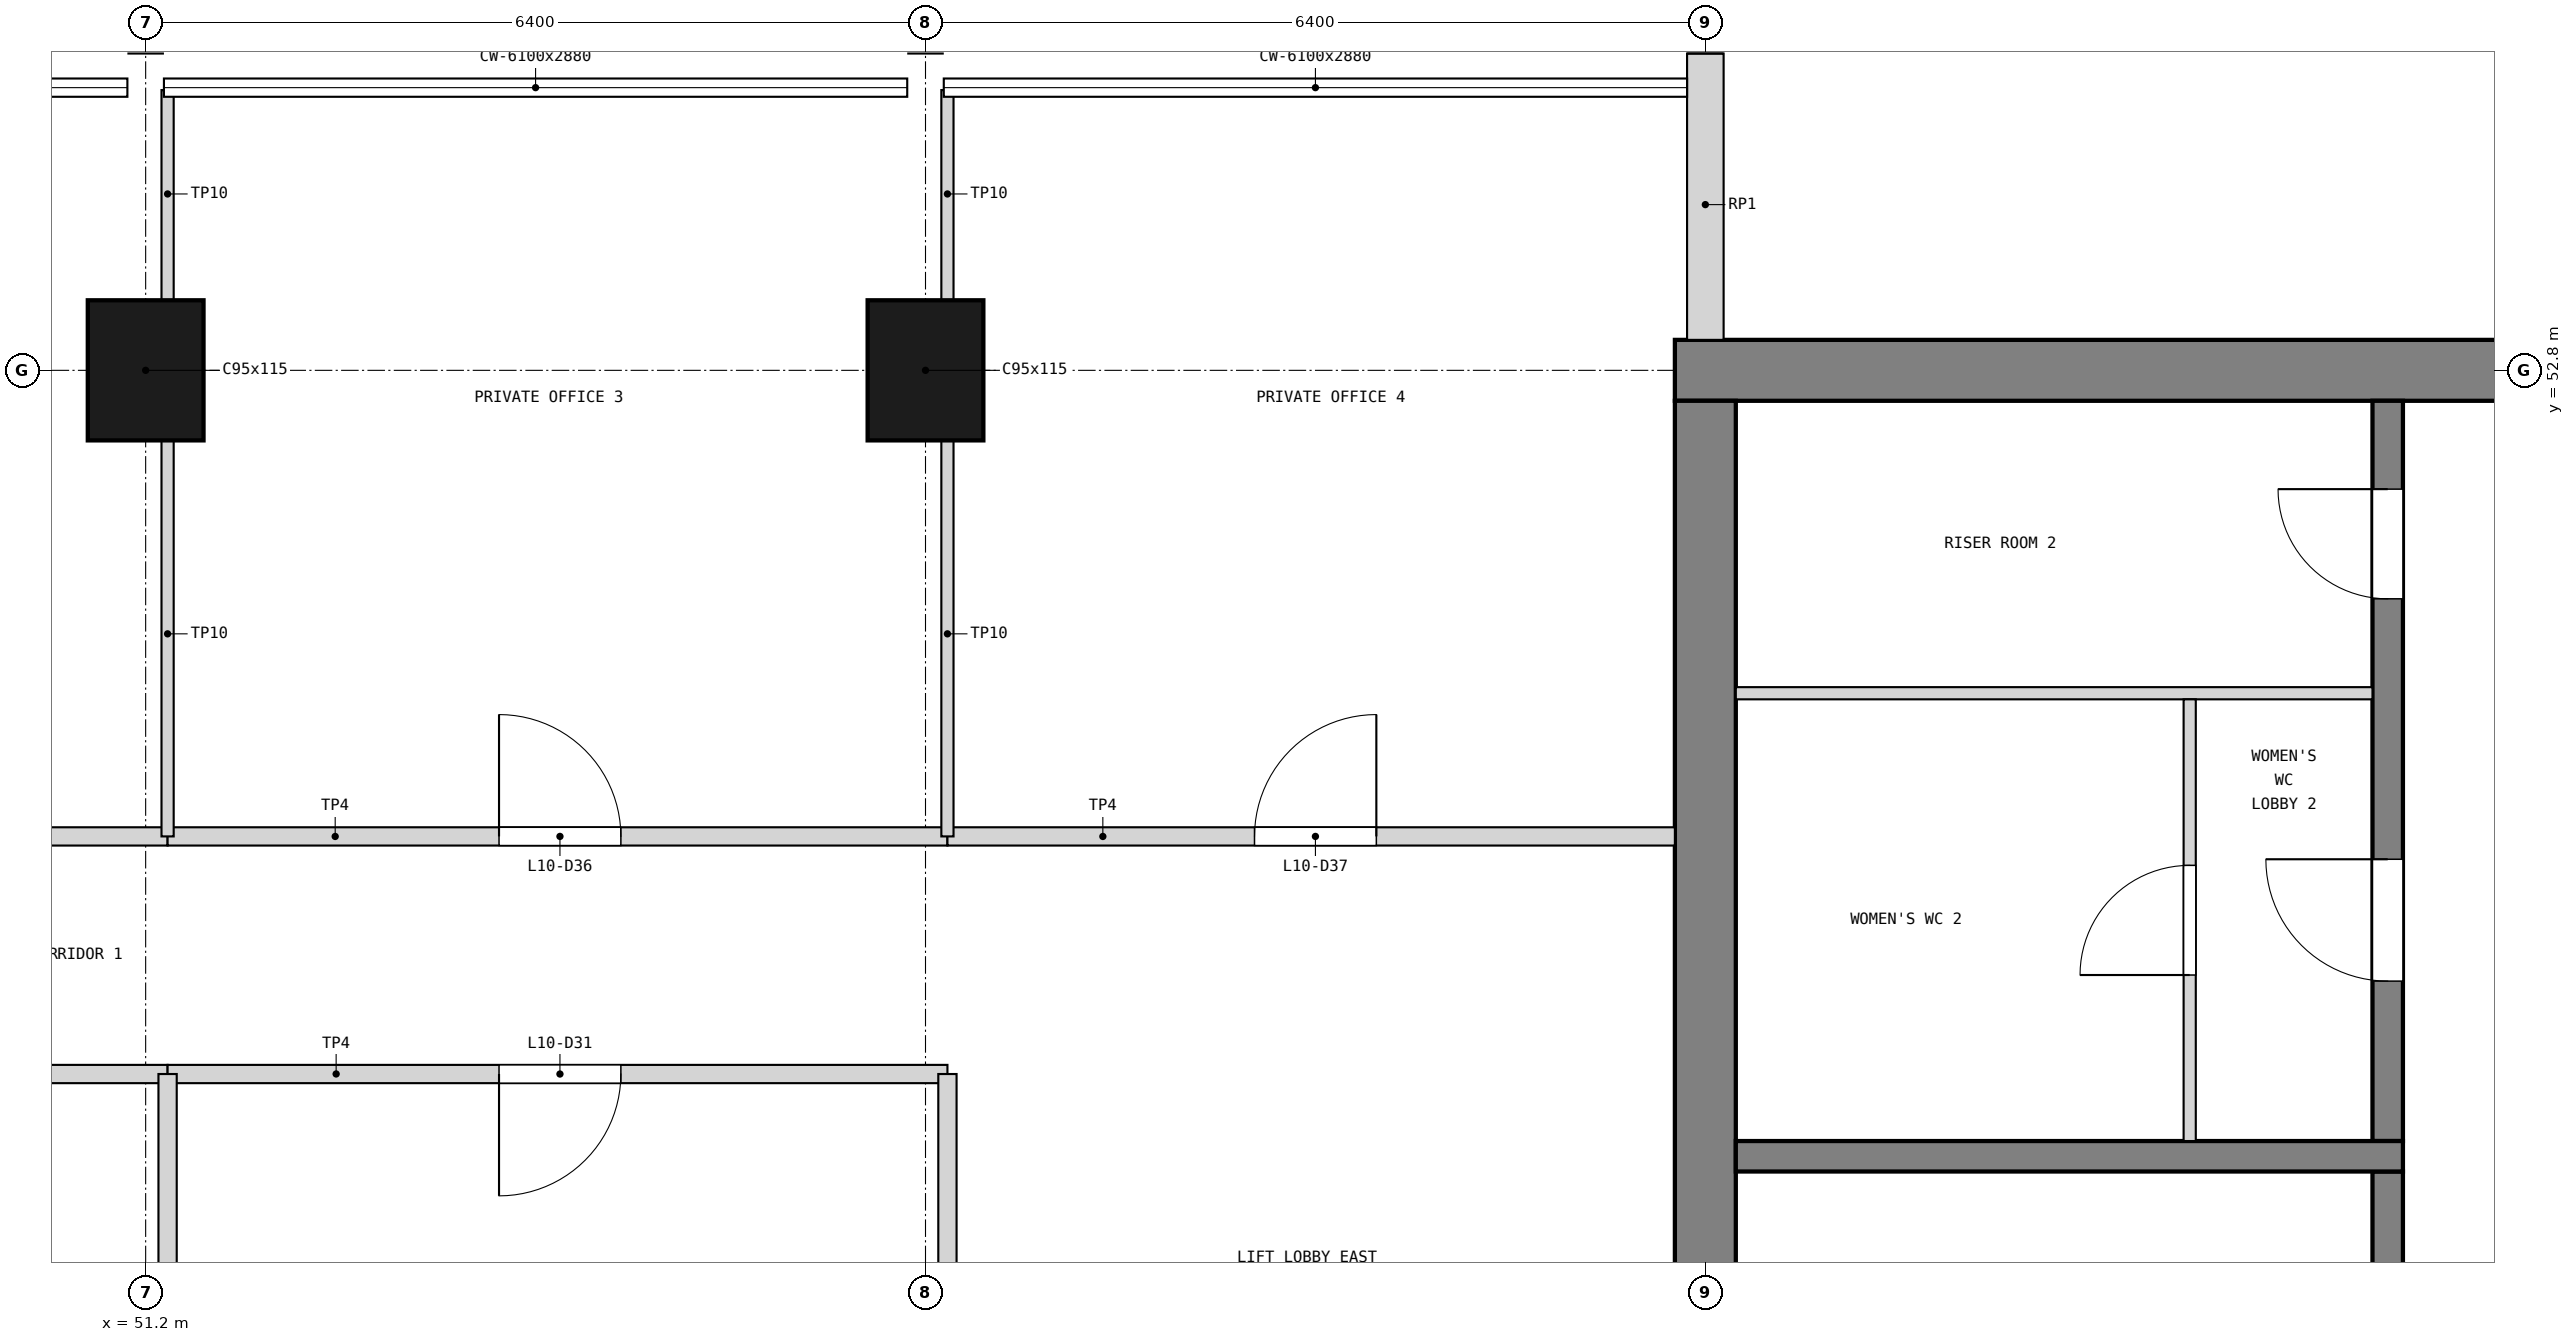
"""IFC4 building model, lengths in metres.
Left out: names, types, materials, properties, quantities, classifications, styles, units other than length and angle.
Written with IfcOpenShell. Run it as: python <this file> out.ifc"""

import sys

from ifc_helpers import new_model, si_unit, direction, frame, frame_2d, origin, origin_2d, place, context, subcontext, project, spatial, rectangle, extrude, element, fill, save


model = new_model("IFC4")
c1 = context("Model", 3, precision=1e-05, world=origin(), true_north=direction((0.0, 1.0)))
c2 = subcontext(c1, "Body", "Model", "MODEL_VIEW")
j1 = project(units=[si_unit("LENGTHUNIT", "METRE"), si_unit("PLANEANGLEUNIT", "RADIAN")], contexts=[c1])
p1 = place(None, origin())
s1 = spatial("IfcSite", under=j1, at=p1, CompositionType="ELEMENT")
p2 = place(p1, origin())
s2 = spatial("IfcBuilding", under=s1, at=p2, CompositionType="ELEMENT")
p3 = place(p2, frame((0.0, 0.0, 40.5)))
s3 = spatial("IfcBuildingStorey", under=s2, at=p3, CompositionType="ELEMENT", Elevation=40.5)
p4 = place(p3, frame((63.75, 52.8, 0.0), z_axis=(0.0, 0.0, 1.0), x_axis=(1.0, 0.0, 0.0)))
e1 = element("IfcWall", 1, at=p4, inside=s3, PredefinedType="SHEAR", context=c2, shape_type="SweptSolid", body=[
    extrude(rectangle(XDim=13.3, YDim=0.5, at=frame_2d((6.65, 0.0))), origin(), (0.0, 0.0, 1.0), 3.9),
])
p5 = place(p4, frame((11.05, 0.0, 1.0)))
e2 = element("IfcOpeningElement", 2, at=p5, cuts=e1, PredefinedType="OPENING", context=c2, shape_type="SweptSolid", body=[
    extrude(rectangle(XDim=0.4, YDim=2.0, at=frame_2d((0.2, 1.0))), frame((0.0, 0.26, 0.0), z_axis=(0.0, -1.0, 0.0), x_axis=(1.0, 0.0, 0.0)), (0.0, 0.0, 1.0), 0.52),
])
p6 = place(p3, frame((64.0, 33.85, 0.0), z_axis=(0.0, 0.0, 1.0), x_axis=(0.0, 1.0, 0.0)))
e3 = element("IfcWall", 3, at=p6, inside=s3, PredefinedType="SHEAR", context=c2, shape_type="SweptSolid", body=[
    extrude(rectangle(XDim=18.7, YDim=0.5, at=frame_2d((9.35, 0.0))), origin(), (0.0, 0.0, 1.0), 3.9),
])
p7 = place(p6, frame((8.35, 0.0, 0.0)))
e4 = element("IfcOpeningElement", 4, at=p7, cuts=e3, PredefinedType="OPENING", context=c2, shape_type="SweptSolid", body=[
    extrude(rectangle(XDim=2.0, YDim=2.1, at=frame_2d((1.0, 1.05))), frame((0.0, 0.26, 0.0), z_axis=(0.0, -1.0, 0.0), x_axis=(1.0, 0.0, 0.0)), (0.0, 0.0, 1.0), 0.52),
])
for number, where, z_axis, x_axis in (
    (5, (51.2, 52.8, 0.0), (0.0, 0.0, 1.0), (1.0, 0.0, 0.0)),
    (6, (57.6, 52.8, 0.0), (0.0, 0.0, 1.0), (1.0, 0.0, 0.0)),
):
    element("IfcColumn", number, at=place(p3, frame(where, z_axis=z_axis, x_axis=x_axis)), inside=s3, PredefinedType="COLUMN", context=c2, shape_type="SweptSolid", body=[
        extrude(rectangle(XDim=0.95, YDim=1.15, at=origin_2d()), origin(), (0.0, 0.0, 1.0), 3.9),
    ])
p8 = place(p3, frame((64.0, 53.05, 0.0), z_axis=(0.0, 0.0, 1.0), x_axis=(0.0, 1.0, 0.0)))
e7 = element("IfcWall", 7, at=p8, inside=s3, PredefinedType="SOLIDWALL", context=c2, shape_type="SweptSolid", body=[
    extrude(rectangle(XDim=2.35, YDim=0.3, at=frame_2d((1.175, 0.0))), origin(), (0.0, 0.0, 1.0), 2.88),
])
p9 = place(p3, frame((69.6, 40.175, 0.0), z_axis=(0.0, 0.0, 1.0), x_axis=(0.0, 1.0, 0.0)))
e8 = element("IfcWall", 8, at=p9, inside=s3, PredefinedType="SOLIDWALL", context=c2, shape_type="SweptSolid", body=[
    extrude(rectangle(XDim=6.05, YDim=0.25, at=frame_2d((3.025, 0.0))), origin(), (0.0, 0.0, 1.0), 3.6),
])
p10 = place(p9, frame((2.025, 0.0, 0.0)))
e9 = element("IfcOpeningElement", 9, at=p10, cuts=e8, PredefinedType="OPENING", context=c2, shape_type="SweptSolid", body=[
    extrude(rectangle(XDim=2.0, YDim=2.1, at=frame_2d((1.0, 1.05))), frame((0.0, 0.135, 0.0), z_axis=(0.0, -1.0, 0.0), x_axis=(1.0, 0.0, 0.0)), (0.0, 0.0, 1.0), 0.27),
])
p11 = place(p3, frame((69.6, 46.475, 0.0), z_axis=(0.0, 0.0, 1.0), x_axis=(0.0, 1.0, 0.0)))
e10 = element("IfcWall", 10, at=p11, inside=s3, PredefinedType="SOLIDWALL", context=c2, shape_type="SweptSolid", body=[
    extrude(rectangle(XDim=6.075, YDim=0.25, at=frame_2d((3.038, 0.0))), origin(), (0.0, 0.0, 1.0), 3.6),
])
p12 = place(p11, frame((1.312, 0.0, 0.0)))
e11 = element("IfcOpeningElement", 11, at=p12, cuts=e10, PredefinedType="OPENING", context=c2, shape_type="SweptSolid", body=[
    extrude(rectangle(XDim=1.0, YDim=2.1, at=frame_2d((0.5, 1.05))), frame((0.0, 0.135, 0.0), z_axis=(0.0, -1.0, 0.0), x_axis=(1.0, 0.0, 0.0)), (0.0, 0.0, 1.0), 0.27),
])
p13 = place(p11, frame((4.45, 0.0, 0.0)))
e12 = element("IfcOpeningElement", 12, at=p13, cuts=e10, PredefinedType="OPENING", context=c2, shape_type="SweptSolid", body=[
    extrude(rectangle(XDim=0.9, YDim=2.1, at=frame_2d((0.45, 1.05))), frame((0.0, 0.135, 0.0), z_axis=(0.0, -1.0, 0.0), x_axis=(1.0, 0.0, 0.0)), (0.0, 0.0, 1.0), 0.27),
])
p14 = place(p3, frame((69.725, 46.35, 0.0), z_axis=(0.0, 0.0, 1.0), x_axis=(-1.0, 0.0, 0.0)))
e13 = element("IfcWall", 13, at=p14, inside=s3, PredefinedType="SOLIDWALL", context=c2, shape_type="SweptSolid", body=[
    extrude(rectangle(XDim=5.475, YDim=0.25, at=frame_2d((2.738, 0.0))), origin(), (0.0, 0.0, 1.0), 3.6),
])
p15 = place(p3, frame((69.475, 50.15, 0.0), z_axis=(0.0, 0.0, 1.0), x_axis=(-1.0, 0.0, 0.0)))
e14 = element("IfcWall", 14, at=p15, inside=s3, PredefinedType="PARTITIONING", context=c2, shape_type="SweptSolid", body=[
    extrude(rectangle(XDim=5.225, YDim=0.1, at=frame_2d((2.613, 0.0))), origin(), (0.0, 0.0, 1.0), 3.6),
])
p16 = place(p3, frame((67.975, 46.475, 0.0), z_axis=(0.0, 0.0, 1.0), x_axis=(0.0, 1.0, 0.0)))
e15 = element("IfcWall", 15, at=p16, inside=s3, PredefinedType="PARTITIONING", context=c2, shape_type="SweptSolid", body=[
    extrude(rectangle(XDim=3.625, YDim=0.1, at=frame_2d((1.812, 0.0))), origin(), (0.0, 0.0, 1.0), 3.6),
])
p17 = place(p16, frame((1.363, 0.0, 0.0)))
e16 = element("IfcOpeningElement", 16, at=p17, cuts=e15, PredefinedType="OPENING", context=c2, shape_type="SweptSolid", body=[
    extrude(rectangle(XDim=0.9, YDim=2.1, at=frame_2d((0.45, 1.05))), frame((0.0, 0.06, 0.0), z_axis=(0.0, -1.0, 0.0), x_axis=(1.0, 0.0, 0.0)), (0.0, 0.0, 1.0), 0.12),
])
p18 = place(p3, frame((31.82, 47.025, 0.0), z_axis=(0.0, 0.0, 1.0), x_axis=(1.0, 0.0, 0.0)))
e17 = element("IfcWall", 17, at=p18, inside=s3, PredefinedType="PARTITIONING", context=c2, shape_type="SweptSolid", body=[
    extrude(rectangle(XDim=19.56, YDim=0.15, at=frame_2d((9.78, 0.0))), origin(), (0.0, 0.0, 1.0), 3.68),
])
p19 = place(p18, frame((4.03, 0.0, 0.0)))
e18 = element("IfcOpeningElement", 18, at=p19, cuts=e17, PredefinedType="OPENING", context=c2, shape_type="SweptSolid", body=[
    extrude(rectangle(XDim=1.8, YDim=2.1, at=frame_2d((0.9, 1.05))), frame((0.0, 0.085, 0.0), z_axis=(0.0, -1.0, 0.0), x_axis=(1.0, 0.0, 0.0)), (0.0, 0.0, 1.0), 0.17),
])
p20 = place(p18, frame((13.73, 0.0, 0.0)))
e19 = element("IfcOpeningElement", 19, at=p20, cuts=e17, PredefinedType="OPENING", context=c2, shape_type="SweptSolid", body=[
    extrude(rectangle(XDim=1.8, YDim=2.1, at=frame_2d((0.9, 1.05))), frame((0.0, 0.085, 0.0), z_axis=(0.0, -1.0, 0.0), x_axis=(1.0, 0.0, 0.0)), (0.0, 0.0, 1.0), 0.17),
])
p21 = place(p3, frame((51.38, 47.025, 0.0), z_axis=(0.0, 0.0, 1.0), x_axis=(1.0, 0.0, 0.0)))
e20 = element("IfcWall", 20, at=p21, inside=s3, PredefinedType="PARTITIONING", context=c2, shape_type="SweptSolid", body=[
    extrude(rectangle(XDim=6.4, YDim=0.15, at=frame_2d((3.2, 0.0))), origin(), (0.0, 0.0, 1.0), 3.68),
])
p22 = place(p21, frame((2.72, 0.0, 0.0)))
e21 = element("IfcOpeningElement", 21, at=p22, cuts=e20, PredefinedType="OPENING", context=c2, shape_type="SweptSolid", body=[
    extrude(rectangle(XDim=1.0, YDim=2.1, at=frame_2d((0.5, 1.05))), frame((0.0, 0.085, 0.0), z_axis=(0.0, -1.0, 0.0), x_axis=(1.0, 0.0, 0.0)), (0.0, 0.0, 1.0), 0.17),
])
p23 = place(p3, frame((51.38, 43.62, 0.0), z_axis=(0.0, 0.0, 1.0), x_axis=(0.0, 1.0, 0.0)))
e22 = element("IfcWall", 22, at=p23, inside=s3, PredefinedType="PARTITIONING", context=c2, shape_type="SweptSolid", body=[
    extrude(rectangle(XDim=3.405, YDim=0.15, at=frame_2d((1.703, 0.0))), origin(), (0.0, 0.0, 1.0), 2.78),
])
p24 = place(p3, frame((44.62, 48.975, 0.0), z_axis=(0.0, 0.0, 1.0), x_axis=(1.0, 0.0, 0.0)))
e23 = element("IfcWall", 23, at=p24, inside=s3, PredefinedType="PARTITIONING", context=c2, shape_type="SweptSolid", body=[
    extrude(rectangle(XDim=6.76, YDim=0.15, at=frame_2d((3.38, 0.0))), origin(), (0.0, 0.0, 1.0), 3.68),
])
p25 = place(p24, frame((2.48, 0.0, 0.0)))
e24 = element("IfcOpeningElement", 24, at=p25, cuts=e23, PredefinedType="OPENING", context=c2, shape_type="SweptSolid", body=[
    extrude(rectangle(XDim=1.8, YDim=2.1, at=frame_2d((0.9, 1.05))), frame((0.0, 0.085, 0.0), z_axis=(0.0, -1.0, 0.0), x_axis=(1.0, 0.0, 0.0)), (0.0, 0.0, 1.0), 0.17),
])
p26 = place(p3, frame((51.38, 48.975, 0.0), z_axis=(0.0, 0.0, 1.0), x_axis=(1.0, 0.0, 0.0)))
e25 = element("IfcWall", 25, at=p26, inside=s3, PredefinedType="PARTITIONING", context=c2, shape_type="SweptSolid", body=[
    extrude(rectangle(XDim=6.4, YDim=0.15, at=frame_2d((3.2, 0.0))), origin(), (0.0, 0.0, 1.0), 3.68),
])
p27 = place(p26, frame((2.72, 0.0, 0.0)))
e26 = element("IfcOpeningElement", 26, at=p27, cuts=e25, PredefinedType="OPENING", context=c2, shape_type="SweptSolid", body=[
    extrude(rectangle(XDim=1.0, YDim=2.1, at=frame_2d((0.5, 1.05))), frame((0.0, 0.085, 0.0), z_axis=(0.0, -1.0, 0.0), x_axis=(1.0, 0.0, 0.0)), (0.0, 0.0, 1.0), 0.17),
])
p28 = place(p3, frame((57.78, 48.975, 0.0), z_axis=(0.0, 0.0, 1.0), x_axis=(1.0, 0.0, 0.0)))
e27 = element("IfcWall", 27, at=p28, inside=s3, PredefinedType="PARTITIONING", context=c2, shape_type="SweptSolid", body=[
    extrude(rectangle(XDim=5.97, YDim=0.15, at=frame_2d((2.985, 0.0))), origin(), (0.0, 0.0, 1.0), 3.68),
])
p29 = place(p28, frame((2.52, 0.0, 0.0)))
e28 = element("IfcOpeningElement", 28, at=p29, cuts=e27, PredefinedType="OPENING", context=c2, shape_type="SweptSolid", body=[
    extrude(rectangle(XDim=1.0, YDim=2.1, at=frame_2d((0.5, 1.05))), frame((0.0, 0.085, 0.0), z_axis=(0.0, -1.0, 0.0), x_axis=(1.0, 0.0, 0.0)), (0.0, 0.0, 1.0), 0.17),
])
p30 = place(p3, frame((51.38, 48.975, 0.0), z_axis=(0.0, 0.0, 1.0), x_axis=(0.0, 1.0, 0.0)))
e29 = element("IfcWall", 29, at=p30, inside=s3, PredefinedType="PARTITIONING", context=c2, shape_type="SweptSolid", body=[
    extrude(rectangle(XDim=3.27, YDim=0.1, at=frame_2d((1.635, 0.0))), origin(), (0.0, 0.0, 1.0), 2.78),
])
p31 = place(p3, frame((51.38, 53.355, 0.0), z_axis=(0.0, 0.0, 1.0), x_axis=(0.0, 1.0, 0.0)))
e30 = element("IfcWall", 30, at=p31, inside=s3, PredefinedType="PARTITIONING", context=c2, shape_type="SweptSolid", body=[
    extrude(rectangle(XDim=1.745, YDim=0.1, at=frame_2d((0.873, 0.0))), origin(), (0.0, 0.0, 1.0), 2.78),
])
p32 = place(p3, frame((57.78, 48.975, 0.0), z_axis=(0.0, 0.0, 1.0), x_axis=(0.0, 1.0, 0.0)))
e31 = element("IfcWall", 31, at=p32, inside=s3, PredefinedType="PARTITIONING", context=c2, shape_type="SweptSolid", body=[
    extrude(rectangle(XDim=3.27, YDim=0.1, at=frame_2d((1.635, 0.0))), origin(), (0.0, 0.0, 1.0), 2.78),
])
p33 = place(p3, frame((57.78, 53.355, 0.0), z_axis=(0.0, 0.0, 1.0), x_axis=(0.0, 1.0, 0.0)))
e32 = element("IfcWall", 32, at=p33, inside=s3, PredefinedType="PARTITIONING", context=c2, shape_type="SweptSolid", body=[
    extrude(rectangle(XDim=1.745, YDim=0.1, at=frame_2d((0.873, 0.0))), origin(), (0.0, 0.0, 1.0), 2.78),
])
p34 = place(p3, frame((57.78, 43.62, 0.0), z_axis=(0.0, 0.0, 1.0), x_axis=(0.0, 1.0, 0.0)))
e33 = element("IfcWall", 33, at=p34, inside=s3, PredefinedType="PARTITIONING", context=c2, shape_type="SweptSolid", body=[
    extrude(rectangle(XDim=3.405, YDim=0.15, at=frame_2d((1.703, 0.0))), origin(), (0.0, 0.0, 1.0), 2.78),
])
p35 = place(p12, origin())
e34 = element("IfcDoor", 34, at=p35, inside=s3, OperationType="SINGLE_SWING_RIGHT", PredefinedType="DOOR", context=c2, shape_type="SweptSolid", body=[
    extrude(rectangle(XDim=1.0, YDim=2.1, at=frame_2d((0.5, 1.05))), frame((0.0, 0.025, 0.0), z_axis=(0.0, -1.0, 0.0), x_axis=(1.0, 0.0, 0.0)), (0.0, 0.0, 1.0), 0.05),
])
fill(e11, e34)
p36 = place(p17, origin())
e35 = element("IfcDoor", 35, at=p36, inside=s3, OperationType="SINGLE_SWING_LEFT", PredefinedType="DOOR", context=c2, shape_type="SweptSolid", body=[
    extrude(rectangle(XDim=0.9, YDim=2.1, at=frame_2d((0.45, 1.05))), frame((0.0, 0.025, 0.0), z_axis=(0.0, -1.0, 0.0), x_axis=(1.0, 0.0, 0.0)), (0.0, 0.0, 1.0), 0.05),
])
fill(e16, e35)
p37 = place(p13, origin())
e36 = element("IfcDoor", 36, at=p37, inside=s3, OperationType="SINGLE_SWING_RIGHT", PredefinedType="DOOR", context=c2, shape_type="SweptSolid", body=[
    extrude(rectangle(XDim=0.9, YDim=2.1, at=frame_2d((0.45, 1.05))), frame((0.0, 0.025, 0.0), z_axis=(0.0, -1.0, 0.0), x_axis=(1.0, 0.0, 0.0)), (0.0, 0.0, 1.0), 0.05),
])
fill(e12, e36)
p38 = place(p22, frame((1.0, 0.0, 0.0), z_axis=(0.0, 0.0, 1.0), x_axis=(-1.0, 0.0, 0.0)))
e37 = element("IfcDoor", 37, at=p38, inside=s3, OperationType="SINGLE_SWING_RIGHT", PredefinedType="DOOR", context=c2, shape_type="SweptSolid", body=[
    extrude(rectangle(XDim=1.0, YDim=2.1, at=frame_2d((0.5, 1.05))), frame((0.0, 0.025, 0.0), z_axis=(0.0, -1.0, 0.0), x_axis=(1.0, 0.0, 0.0)), (0.0, 0.0, 1.0), 0.05),
])
fill(e21, e37)
p39 = place(p27, origin())
e38 = element("IfcDoor", 38, at=p39, inside=s3, OperationType="SINGLE_SWING_LEFT", PredefinedType="DOOR", context=c2, shape_type="SweptSolid", body=[
    extrude(rectangle(XDim=1.0, YDim=2.1, at=frame_2d((0.5, 1.05))), frame((0.0, 0.025, 0.0), z_axis=(0.0, -1.0, 0.0), x_axis=(1.0, 0.0, 0.0)), (0.0, 0.0, 1.0), 0.05),
])
fill(e26, e38)
p40 = place(p29, origin())
e39 = element("IfcDoor", 39, at=p40, inside=s3, OperationType="SINGLE_SWING_RIGHT", PredefinedType="DOOR", context=c2, shape_type="SweptSolid", body=[
    extrude(rectangle(XDim=1.0, YDim=2.1, at=frame_2d((0.5, 1.05))), frame((0.0, 0.025, 0.0), z_axis=(0.0, -1.0, 0.0), x_axis=(1.0, 0.0, 0.0)), (0.0, 0.0, 1.0), 0.05),
])
fill(e28, e39)
save(model, sys.argv[1])
